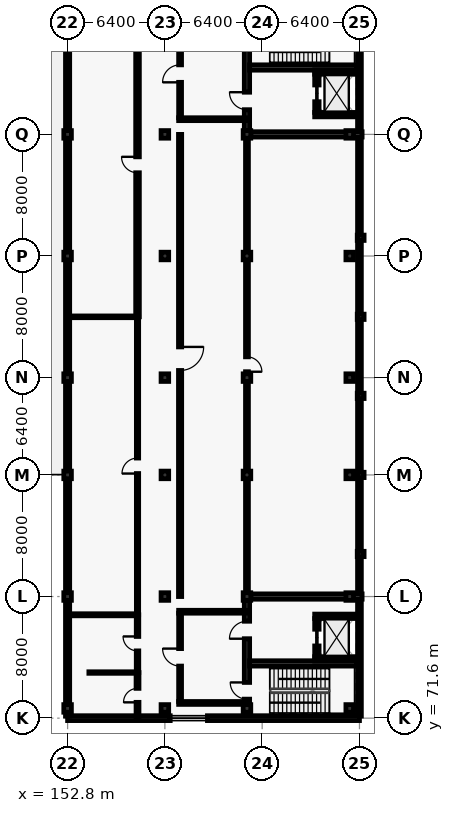
"""IFC4 building model, lengths in metres.
Left out: names, types, materials, properties, quantities, classifications, styles, units other than length and angle.
Written with IfcOpenShell. Run it as: python <this file> out.ifc"""

import sys

from ifc_helpers import new_model, si_unit, direction, frame, frame_2d, origin, origin_2d, place, context, subcontext, project, spatial, rectangle, extrude, element, fill, save


model = new_model("IFC4")
c1 = context("Model", 3, precision=1e-05, world=origin(), true_north=direction((0.0, 1.0)))
c2 = subcontext(c1, "Body", "Model", "MODEL_VIEW")
j1 = project(units=[si_unit("LENGTHUNIT", "METRE"), si_unit("PLANEANGLEUNIT", "RADIAN")], contexts=[c1])
p1 = place(None, origin())
s1 = spatial("IfcSite", under=j1, at=p1, CompositionType="ELEMENT")
p2 = place(p1, origin())
s2 = spatial("IfcBuilding", under=s1, at=p2, CompositionType="ELEMENT")
p3 = place(p2, frame((0.0, 0.0, 24.9)))
s3 = spatial("IfcBuildingStorey", under=s2, at=p3, CompositionType="ELEMENT", Elevation=24.9)
for number, where, z_axis, x_axis in (
    (1, (152.8, 72.24, 0.0), (0.0, 0.0, 1.0), (1.0, 0.0, 0.0)),
    (2, (152.8, 79.6, 0.0), (0.0, 0.0, 1.0), (1.0, 0.0, 0.0)),
    (3, (152.8, 87.6, 0.0), (0.0, 0.0, 1.0), (1.0, 0.0, 0.0)),
    (4, (152.8, 94.0, 0.0), (0.0, 0.0, 1.0), (1.0, 0.0, 0.0)),
    (5, (152.8, 102.0, 0.0), (0.0, 0.0, 1.0), (1.0, 0.0, 0.0)),
    (6, (152.8, 110.0, 0.0), (0.0, 0.0, 1.0), (1.0, 0.0, 0.0)),
    (7, (159.2, 72.24, 0.0), (0.0, 0.0, 1.0), (1.0, 0.0, 0.0)),
    (8, (159.2, 79.6, 0.0), (0.0, 0.0, 1.0), (1.0, 0.0, 0.0)),
    (9, (159.2, 87.6, 0.0), (0.0, 0.0, 1.0), (1.0, 0.0, 0.0)),
    (10, (159.2, 94.0, 0.0), (0.0, 0.0, 1.0), (1.0, 0.0, 0.0)),
    (11, (159.2, 102.0, 0.0), (0.0, 0.0, 1.0), (1.0, 0.0, 0.0)),
    (12, (159.2, 110.0, 0.0), (0.0, 0.0, 1.0), (1.0, 0.0, 0.0)),
    (13, (164.6, 72.24, 0.0), (0.0, 0.0, 1.0), (1.0, 0.0, 0.0)),
    (14, (164.6, 79.6, 0.0), (0.0, 0.0, 1.0), (1.0, 0.0, 0.0)),
    (15, (164.6, 87.6, 0.0), (0.0, 0.0, 1.0), (1.0, 0.0, 0.0)),
    (16, (164.6, 94.0, 0.0), (0.0, 0.0, 1.0), (1.0, 0.0, 0.0)),
    (17, (164.6, 102.0, 0.0), (0.0, 0.0, 1.0), (1.0, 0.0, 0.0)),
    (18, (164.6, 110.0, 0.0), (0.0, 0.0, 1.0), (1.0, 0.0, 0.0)),
    (19, (171.36, 72.24, 0.0), (0.0, 0.0, 1.0), (1.0, 0.0, 0.0)),
    (20, (171.36, 79.6, 0.0), (0.0, 0.0, 1.0), (1.0, 0.0, 0.0)),
    (21, (171.36, 87.6, 0.0), (0.0, 0.0, 1.0), (1.0, 0.0, 0.0)),
    (22, (171.36, 94.0, 0.0), (0.0, 0.0, 1.0), (1.0, 0.0, 0.0)),
    (23, (171.36, 102.0, 0.0), (0.0, 0.0, 1.0), (1.0, 0.0, 0.0)),
    (24, (171.36, 110.0, 0.0), (0.0, 0.0, 1.0), (1.0, 0.0, 0.0)),
):
    element("IfcColumn", number, at=place(p3, frame(where, z_axis=z_axis, x_axis=x_axis)), inside=s3, PredefinedType="COLUMN", context=c2, shape_type="SweptSolid", body=[
        extrude(rectangle(XDim=0.5, YDim=0.5, at=origin_2d()), origin(), (0.0, 0.0, 1.0), 4.5),
    ])
for number, where, z_axis, x_axis in (
    (25, (172.08, 82.4, 0.0), (0.0, 0.0, 1.0), (1.0, 0.0, 0.0)),
    (26, (172.08, 87.6, 0.0), (0.0, 0.0, 1.0), (1.0, 0.0, 0.0)),
    (27, (172.08, 92.8, 0.0), (0.0, 0.0, 1.0), (1.0, 0.0, 0.0)),
    (28, (172.08, 98.0, 0.0), (0.0, 0.0, 1.0), (1.0, 0.0, 0.0)),
    (29, (172.08, 103.2, 0.0), (0.0, 0.0, 1.0), (1.0, 0.0, 0.0)),
):
    element("IfcColumn", number, at=place(p3, frame(where, z_axis=z_axis, x_axis=x_axis)), inside=s3, PredefinedType="PILASTER", context=c2, shape_type="SweptSolid", body=[
        extrude(rectangle(XDim=0.35, YDim=0.45, at=origin_2d()), origin(), (0.0, 0.0, 1.0), 4.5),
    ])
p4 = place(p3, frame((172.0, 117.86, 0.0), z_axis=(0.0, 0.0, 1.0), x_axis=(0.0, -1.0, 0.0)))
e30 = element("IfcWall", 30, at=p4, inside=s3, PredefinedType="SOLIDWALL", context=c2, shape_type="SweptSolid", body=[
    extrude(rectangle(XDim=46.12, YDim=0.25, at=frame_2d((23.06, 0.0))), origin(), (0.0, 0.0, 1.0), 4.3),
])
p5 = place(p3, frame((172.0, 71.6, 0.0), z_axis=(0.0, 0.0, 1.0), x_axis=(-1.0, 0.0, 0.0)))
e31 = element("IfcWall", 31, at=p5, inside=s3, PredefinedType="SOLIDWALL", context=c2, shape_type="SweptSolid", body=[
    extrude(rectangle(XDim=19.2, YDim=0.32, at=frame_2d((9.6, 0.0))), origin(), (0.0, 0.0, 1.0), 4.3),
])
p6 = place(p5, frame((10.0, 0.0, 0.8)))
e32 = element("IfcOpeningElement", 32, at=p6, cuts=e31, PredefinedType="OPENING", context=c2, shape_type="SweptSolid", body=[
    extrude(rectangle(XDim=2.45, YDim=2.8, at=frame_2d((1.225, 1.4))), frame((0.0, 0.17, 0.0), z_axis=(0.0, -1.0, 0.0), x_axis=(1.0, 0.0, 0.0)), (0.0, 0.0, 1.0), 0.34),
])
p7 = place(p3, frame((152.8, 71.74, 0.0), z_axis=(0.0, 0.0, 1.0), x_axis=(0.0, 1.0, 0.0)))
e33 = element("IfcWall", 33, at=p7, inside=s3, PredefinedType="SOLIDWALL", context=c2, shape_type="SweptSolid", body=[
    extrude(rectangle(XDim=46.12, YDim=0.275, at=frame_2d((23.06, 0.0))), origin(), (0.0, 0.0, 1.0), 3.45),
])
p8 = place(p3, frame((164.852, 79.6, 0.0), z_axis=(0.0, 0.0, 1.0), x_axis=(1.0, 0.0, 0.0)))
e34 = element("IfcWall", 34, at=p8, inside=s3, PredefinedType="SHEAR", context=c2, shape_type="SweptSolid", body=[
    extrude(rectangle(XDim=7.323, YDim=0.35, at=frame_2d((3.662, 0.0))), origin(), (0.0, 0.0, 1.0), 4.3),
])
p9 = place(p3, frame((164.6, 71.775, 0.0), z_axis=(0.0, 0.0, 1.0), x_axis=(0.0, 1.0, 0.0)))
e35 = element("IfcWall", 35, at=p9, inside=s3, PredefinedType="SHEAR", context=c2, shape_type="SweptSolid", body=[
    extrude(rectangle(XDim=7.573, YDim=0.35, at=frame_2d((3.787, 0.0))), origin(), (0.0, 0.0, 1.0), 4.3),
])
p10 = place(p9, frame((1.075, 0.0, 0.0)))
e36 = element("IfcOpeningElement", 36, at=p10, cuts=e35, PredefinedType="OPENING", context=c2, shape_type="SweptSolid", body=[
    extrude(rectangle(XDim=1.1, YDim=2.15, at=frame_2d((0.55, 1.075))), frame((0.0, 0.185, 0.0), z_axis=(0.0, -1.0, 0.0), x_axis=(1.0, 0.0, 0.0)), (0.0, 0.0, 1.0), 0.37),
])
p11 = place(p9, frame((5.05, 0.0, 0.0)))
e37 = element("IfcOpeningElement", 37, at=p11, cuts=e35, PredefinedType="OPENING", context=c2, shape_type="SweptSolid", body=[
    extrude(rectangle(XDim=1.15, YDim=2.2, at=frame_2d((0.575, 1.1))), frame((0.0, 0.185, 0.0), z_axis=(0.0, -1.0, 0.0), x_axis=(1.0, 0.0, 0.0)), (0.0, 0.0, 1.0), 0.37),
])
p12 = place(p3, frame((164.775, 75.2, 0.0), z_axis=(0.0, 0.0, 1.0), x_axis=(1.0, 0.0, 0.0)))
e38 = element("IfcWall", 38, at=p12, inside=s3, PredefinedType="SHEAR", context=c2, shape_type="SweptSolid", body=[
    extrude(rectangle(XDim=7.05, YDim=0.35, at=frame_2d((3.525, 0.0))), origin(), (0.0, 0.0, 1.0), 4.3),
])
for number, where, z_axis, x_axis in (
    (39, (169.055, 75.5, 0.0), (0.0, 0.0, 1.0), (1.0, 0.0, 0.0)),
    (40, (169.055, 78.3, 0.0), (0.0, 0.0, 1.0), (1.0, 0.0, 0.0)),
):
    element("IfcWall", number, at=place(p3, frame(where, z_axis=z_axis, x_axis=x_axis)), inside=s3, PredefinedType="SHEAR", context=c2, shape_type="SweptSolid", body=[
        extrude(rectangle(XDim=2.89, YDim=0.29, at=frame_2d((1.445, 0.0))), origin(), (0.0, 0.0, 1.0), 4.3),
    ])
p13 = place(p3, frame((169.2, 75.645, 0.0), z_axis=(0.0, 0.0, 1.0), x_axis=(0.0, 1.0, 0.0)))
e41 = element("IfcWall", 41, at=p13, inside=s3, PredefinedType="SHEAR", context=c2, shape_type="SweptSolid", body=[
    extrude(rectangle(XDim=2.51, YDim=0.29, at=frame_2d((1.255, 0.0))), origin(), (0.0, 0.0, 1.0), 4.3),
])
p14 = place(p13, frame((0.705, 0.0, 0.0)))
e42 = element("IfcOpeningElement", 42, at=p14, cuts=e41, PredefinedType="OPENING", context=c2, shape_type="SweptSolid", body=[
    extrude(rectangle(XDim=1.1, YDim=2.15, at=frame_2d((0.55, 1.075))), frame((0.0, 0.155, 0.0), z_axis=(0.0, -1.0, 0.0), x_axis=(1.0, 0.0, 0.0)), (0.0, 0.0, 1.0), 0.31),
])
p15 = place(p3, frame((160.105, 72.6, 0.0), z_axis=(0.0, 0.0, 1.0), x_axis=(1.0, 0.0, 0.0)))
e43 = element("IfcWall", 43, at=p15, inside=s3, PredefinedType="PARTITIONING", context=c2, shape_type="SweptSolid", body=[
    extrude(rectangle(XDim=4.495, YDim=0.19, at=frame_2d((2.248, 0.0))), origin(), (0.0, 0.0, 1.0), 3.65),
])
p16 = place(p3, frame((160.105, 78.6, 0.0), z_axis=(0.0, 0.0, 1.0), x_axis=(1.0, 0.0, 0.0)))
e44 = element("IfcWall", 44, at=p16, inside=s3, PredefinedType="PARTITIONING", context=c2, shape_type="SweptSolid", body=[
    extrude(rectangle(XDim=4.495, YDim=0.19, at=frame_2d((2.248, 0.0))), origin(), (0.0, 0.0, 1.0), 4.3),
])
p17 = place(p3, frame((160.2, 72.695, 0.0), z_axis=(0.0, 0.0, 1.0), x_axis=(0.0, 1.0, 0.0)))
e45 = element("IfcWall", 45, at=p17, inside=s3, PredefinedType="PARTITIONING", context=c2, shape_type="SweptSolid", body=[
    extrude(rectangle(XDim=5.81, YDim=0.19, at=frame_2d((2.905, 0.0))), origin(), (0.0, 0.0, 1.0), 4.3),
])
p18 = place(p17, frame((2.33, 0.0, 0.0)))
e46 = element("IfcOpeningElement", 46, at=p18, cuts=e45, PredefinedType="OPENING", context=c2, shape_type="SweptSolid", body=[
    extrude(rectangle(XDim=1.15, YDim=2.2, at=frame_2d((0.575, 1.1))), frame((0.0, 0.105, 0.0), z_axis=(0.0, -1.0, 0.0), x_axis=(1.0, 0.0, 0.0)), (0.0, 0.0, 1.0), 0.21),
])
p19 = place(p3, frame((164.852, 110.0, 0.0), z_axis=(0.0, 0.0, 1.0), x_axis=(1.0, 0.0, 0.0)))
e47 = element("IfcWall", 47, at=p19, inside=s3, PredefinedType="SHEAR", context=c2, shape_type="SweptSolid", body=[
    extrude(rectangle(XDim=7.323, YDim=0.35, at=frame_2d((3.662, 0.0))), origin(), (0.0, 0.0, 1.0), 4.3),
])
p20 = place(p3, frame((164.6, 110.252, 0.0), z_axis=(0.0, 0.0, 1.0), x_axis=(0.0, 1.0, 0.0)))
e48 = element("IfcWall", 48, at=p20, inside=s3, PredefinedType="SHEAR", context=c2, shape_type="SweptSolid", body=[
    extrude(rectangle(XDim=7.573, YDim=0.35, at=frame_2d((3.787, 0.0))), origin(), (0.0, 0.0, 1.0), 4.3),
])
p21 = place(p20, frame((5.398, 0.0, 0.0)))
e49 = element("IfcOpeningElement", 49, at=p21, cuts=e48, PredefinedType="OPENING", context=c2, shape_type="SweptSolid", body=[
    extrude(rectangle(XDim=1.1, YDim=2.15, at=frame_2d((0.55, 1.075))), frame((0.0, 0.185, 0.0), z_axis=(0.0, -1.0, 0.0), x_axis=(1.0, 0.0, 0.0)), (0.0, 0.0, 1.0), 0.37),
])
p22 = place(p20, frame((1.373, 0.0, 0.0)))
e50 = element("IfcOpeningElement", 50, at=p22, cuts=e48, PredefinedType="OPENING", context=c2, shape_type="SweptSolid", body=[
    extrude(rectangle(XDim=1.15, YDim=2.2, at=frame_2d((0.575, 1.1))), frame((0.0, 0.185, 0.0), z_axis=(0.0, -1.0, 0.0), x_axis=(1.0, 0.0, 0.0)), (0.0, 0.0, 1.0), 0.37),
])
p23 = place(p3, frame((164.775, 114.4, 0.0), z_axis=(0.0, 0.0, 1.0), x_axis=(1.0, 0.0, 0.0)))
e51 = element("IfcWall", 51, at=p23, inside=s3, PredefinedType="SHEAR", context=c2, shape_type="SweptSolid", body=[
    extrude(rectangle(XDim=7.05, YDim=0.35, at=frame_2d((3.525, 0.0))), origin(), (0.0, 0.0, 1.0), 4.3),
])
for number, where, z_axis, x_axis in (
    (52, (169.055, 111.3, 0.0), (0.0, 0.0, 1.0), (1.0, 0.0, 0.0)),
    (53, (169.055, 114.1, 0.0), (0.0, 0.0, 1.0), (1.0, 0.0, 0.0)),
):
    element("IfcWall", number, at=place(p3, frame(where, z_axis=z_axis, x_axis=x_axis)), inside=s3, PredefinedType="SHEAR", context=c2, shape_type="SweptSolid", body=[
        extrude(rectangle(XDim=2.89, YDim=0.29, at=frame_2d((1.445, 0.0))), origin(), (0.0, 0.0, 1.0), 4.3),
    ])
p24 = place(p3, frame((169.2, 111.445, 0.0), z_axis=(0.0, 0.0, 1.0), x_axis=(0.0, 1.0, 0.0)))
e54 = element("IfcWall", 54, at=p24, inside=s3, PredefinedType="SHEAR", context=c2, shape_type="SweptSolid", body=[
    extrude(rectangle(XDim=2.51, YDim=0.29, at=frame_2d((1.255, 0.0))), origin(), (0.0, 0.0, 1.0), 4.3),
])
p25 = place(p24, frame((0.705, 0.0, 0.0)))
e55 = element("IfcOpeningElement", 55, at=p25, cuts=e54, PredefinedType="OPENING", context=c2, shape_type="SweptSolid", body=[
    extrude(rectangle(XDim=1.1, YDim=2.15, at=frame_2d((0.55, 1.075))), frame((0.0, 0.155, 0.0), z_axis=(0.0, -1.0, 0.0), x_axis=(1.0, 0.0, 0.0)), (0.0, 0.0, 1.0), 0.31),
])
p26 = place(p3, frame((160.105, 111.0, 0.0), z_axis=(0.0, 0.0, 1.0), x_axis=(1.0, 0.0, 0.0)))
e56 = element("IfcWall", 56, at=p26, inside=s3, PredefinedType="PARTITIONING", context=c2, shape_type="SweptSolid", body=[
    extrude(rectangle(XDim=4.495, YDim=0.19, at=frame_2d((2.248, 0.0))), origin(), (0.0, 0.0, 1.0), 4.3),
])
p27 = place(p3, frame((160.2, 111.095, 0.0), z_axis=(0.0, 0.0, 1.0), x_axis=(0.0, 1.0, 0.0)))
e57 = element("IfcWall", 57, at=p27, inside=s3, PredefinedType="PARTITIONING", context=c2, shape_type="SweptSolid", body=[
    extrude(rectangle(XDim=5.81, YDim=0.19, at=frame_2d((2.905, 0.0))), origin(), (0.0, 0.0, 1.0), 4.3),
])
p28 = place(p27, frame((2.33, 0.0, 0.0)))
e58 = element("IfcOpeningElement", 58, at=p28, cuts=e57, PredefinedType="OPENING", context=c2, shape_type="SweptSolid", body=[
    extrude(rectangle(XDim=1.15, YDim=2.2, at=frame_2d((0.575, 1.1))), frame((0.0, 0.105, 0.0), z_axis=(0.0, -1.0, 0.0), x_axis=(1.0, 0.0, 0.0)), (0.0, 0.0, 1.0), 0.21),
])
p29 = place(p3, frame((157.4, 71.6, 0.0), z_axis=(0.0, 0.0, 1.0), x_axis=(0.0, 1.0, 0.0)))
e59 = element("IfcWall", 59, at=p29, inside=s3, PredefinedType="PARTITIONING", context=c2, shape_type="SweptSolid", body=[
    extrude(rectangle(XDim=3.0, YDim=0.19, at=frame_2d((1.5, 0.0))), origin(), (0.0, 0.0, 1.0), 4.3),
])
p30 = place(p29, frame((1.04, 0.0, 0.0)))
e60 = element("IfcOpeningElement", 60, at=p30, cuts=e59, PredefinedType="OPENING", context=c2, shape_type="SweptSolid", body=[
    extrude(rectangle(XDim=0.92, YDim=2.1, at=frame_2d((0.46, 1.05))), frame((0.0, 0.105, 0.0), z_axis=(0.0, -1.0, 0.0), x_axis=(1.0, 0.0, 0.0)), (0.0, 0.0, 1.0), 0.21),
])
p31 = place(p3, frame((157.4, 74.6, 0.0), z_axis=(0.0, 0.0, 1.0), x_axis=(0.0, 1.0, 0.0)))
e61 = element("IfcWall", 61, at=p31, inside=s3, PredefinedType="PARTITIONING", context=c2, shape_type="SweptSolid", body=[
    extrude(rectangle(XDim=3.8, YDim=0.165, at=frame_2d((1.9, 0.0))), origin(), (0.0, 0.0, 1.0), 4.3),
])
p32 = place(p31, frame((1.425, 0.0, 0.0)))
e62 = element("IfcOpeningElement", 62, at=p32, cuts=e61, PredefinedType="OPENING", context=c2, shape_type="SweptSolid", body=[
    extrude(rectangle(XDim=0.95, YDim=2.1, at=frame_2d((0.475, 1.05))), frame((0.0, 0.093, 0.0), z_axis=(0.0, -1.0, 0.0), x_axis=(1.0, 0.0, 0.0)), (0.0, 0.0, 1.0), 0.185),
])
p33 = place(p3, frame((157.4, 78.4, 0.0), z_axis=(0.0, 0.0, 1.0), x_axis=(0.0, 1.0, 0.0)))
e63 = element("IfcWall", 63, at=p33, inside=s3, PredefinedType="PARTITIONING", context=c2, shape_type="SweptSolid", body=[
    extrude(rectangle(XDim=19.6, YDim=0.15, at=frame_2d((9.8, 0.0))), origin(), (0.0, 0.0, 1.0), 4.3),
])
p34 = place(p33, frame((9.29, 0.0, 0.0)))
e64 = element("IfcOpeningElement", 64, at=p34, cuts=e63, PredefinedType="OPENING", context=c2, shape_type="SweptSolid", body=[
    extrude(rectangle(XDim=1.02, YDim=2.1, at=frame_2d((0.51, 1.05))), frame((0.0, 0.085, 0.0), z_axis=(0.0, -1.0, 0.0), x_axis=(1.0, 0.0, 0.0)), (0.0, 0.0, 1.0), 0.17),
])
p35 = place(p3, frame((157.4, 98.0, 0.0), z_axis=(0.0, 0.0, 1.0), x_axis=(0.0, 1.0, 0.0)))
e65 = element("IfcWall", 65, at=p35, inside=s3, PredefinedType="PARTITIONING", context=c2, shape_type="SweptSolid", body=[
    extrude(rectangle(XDim=20.0, YDim=0.24, at=frame_2d((10.0, 0.0))), origin(), (0.0, 0.0, 1.0), 4.3),
])
p36 = place(p35, frame((9.475, 0.0, 0.0)))
e66 = element("IfcOpeningElement", 66, at=p36, cuts=e65, PredefinedType="OPENING", context=c2, shape_type="SweptSolid", body=[
    extrude(rectangle(XDim=1.05, YDim=2.15, at=frame_2d((0.525, 1.075))), frame((0.0, 0.13, 0.0), z_axis=(0.0, -1.0, 0.0), x_axis=(1.0, 0.0, 0.0)), (0.0, 0.0, 1.0), 0.26),
])
p37 = place(p3, frame((160.2, 110.0, 0.0), z_axis=(0.0, 0.0, 1.0), x_axis=(0.0, -1.0, 0.0)))
e67 = element("IfcWall", 67, at=p37, inside=s3, PredefinedType="PARTITIONING", context=c2, shape_type="SweptSolid", body=[
    extrude(rectangle(XDim=30.4, YDim=0.21, at=frame_2d((15.2, 0.0))), origin(), (0.0, 0.0, 1.0), 4.3),
])
p38 = place(p37, frame((13.98, 0.0, 0.0)))
e68 = element("IfcOpeningElement", 68, at=p38, cuts=e67, PredefinedType="OPENING", context=c2, shape_type="SweptSolid", body=[
    extrude(rectangle(XDim=1.55, YDim=2.25, at=frame_2d((0.775, 1.125))), frame((0.0, 0.115, 0.0), z_axis=(0.0, -1.0, 0.0), x_axis=(1.0, 0.0, 0.0)), (0.0, 0.0, 1.0), 0.23),
])
p39 = place(p3, frame((154.2, 74.6, 0.0), z_axis=(0.0, 0.0, 1.0), x_axis=(1.0, 0.0, 0.0)))
e69 = element("IfcWall", 69, at=p39, inside=s3, PredefinedType="PARTITIONING", context=c2, shape_type="SweptSolid", body=[
    extrude(rectangle(XDim=3.2, YDim=0.1, at=frame_2d((1.6, 0.0))), origin(), (0.0, 0.0, 1.0), 4.3),
])
p40 = place(p3, frame((152.8, 78.4, 0.0), z_axis=(0.0, 0.0, 1.0), x_axis=(1.0, 0.0, 0.0)))
e70 = element("IfcWall", 70, at=p40, inside=s3, PredefinedType="PARTITIONING", context=c2, shape_type="SweptSolid", body=[
    extrude(rectangle(XDim=4.6, YDim=0.135, at=frame_2d((2.3, 0.0))), origin(), (0.0, 0.0, 1.0), 4.3),
])
p41 = place(p3, frame((152.8, 98.0, 0.0), z_axis=(0.0, 0.0, 1.0), x_axis=(1.0, 0.0, 0.0)))
e71 = element("IfcWall", 71, at=p41, inside=s3, PredefinedType="PARTITIONING", context=c2, shape_type="SweptSolid", body=[
    extrude(rectangle(XDim=4.6, YDim=0.115, at=frame_2d((2.3, 0.0))), origin(), (0.0, 0.0, 1.0), 4.3),
])
p42 = place(p3, frame((164.6, 109.748, 0.0), z_axis=(0.0, 0.0, 1.0), x_axis=(0.0, -1.0, 0.0)))
e72 = element("IfcWall", 72, at=p42, inside=s3, PredefinedType="PARTITIONING", context=c2, shape_type="SweptSolid", body=[
    extrude(rectangle(XDim=29.896, YDim=0.19, at=frame_2d((14.948, 0.0))), origin(), (0.0, 0.0, 1.0), 3.45),
])
p43 = place(p42, frame((14.38, 0.0, 0.0)))
e73 = element("IfcOpeningElement", 73, at=p43, cuts=e72, PredefinedType="OPENING", context=c2, shape_type="SweptSolid", body=[
    extrude(rectangle(XDim=0.98, YDim=2.1, at=frame_2d((0.49, 1.05))), frame((0.0, 0.105, 0.0), z_axis=(0.0, -1.0, 0.0), x_axis=(1.0, 0.0, 0.0)), (0.0, 0.0, 1.0), 0.21),
])
p44 = place(p6, origin())
e74 = element("IfcWindow", 74, at=p44, inside=s3, PartitioningType="SINGLE_PANEL", PredefinedType="WINDOW", context=c2, shape_type="SweptSolid", body=[
    extrude(rectangle(XDim=2.45, YDim=2.8, at=frame_2d((1.225, 1.4))), frame((0.0, 0.03, 0.0), z_axis=(0.0, -1.0, 0.0), x_axis=(1.0, 0.0, 0.0)), (0.0, 0.0, 1.0), 0.06),
])
fill(e32, e74)
p45 = place(p10, origin())
e75 = element("IfcDoor", 75, at=p45, inside=s3, OperationType="SINGLE_SWING_RIGHT", PredefinedType="DOOR", context=c2, shape_type="SweptSolid", body=[
    extrude(rectangle(XDim=1.1, YDim=2.15, at=frame_2d((0.55, 1.075))), frame((0.0, 0.025, 0.0), z_axis=(0.0, -1.0, 0.0), x_axis=(1.0, 0.0, 0.0)), (0.0, 0.0, 1.0), 0.05),
])
fill(e36, e75)
p46 = place(p11, origin())
e76 = element("IfcDoor", 76, at=p46, inside=s3, OperationType="SINGLE_SWING_LEFT", PredefinedType="DOOR", context=c2, shape_type="SweptSolid", body=[
    extrude(rectangle(XDim=1.15, YDim=2.2, at=frame_2d((0.575, 1.1))), frame((0.0, 0.025, 0.0), z_axis=(0.0, -1.0, 0.0), x_axis=(1.0, 0.0, 0.0)), (0.0, 0.0, 1.0), 0.05),
])
fill(e37, e76)
p47 = place(p14, origin())
e77 = element("IfcDoor", 77, at=p47, inside=s3, OperationType="SLIDING_TO_LEFT", PredefinedType="DOOR", context=c2, shape_type="SweptSolid", body=[
    extrude(rectangle(XDim=1.1, YDim=2.15, at=frame_2d((0.55, 1.075))), frame((0.0, 0.025, 0.0), z_axis=(0.0, -1.0, 0.0), x_axis=(1.0, 0.0, 0.0)), (0.0, 0.0, 1.0), 0.05),
])
fill(e42, e77)
p48 = place(p18, origin())
e78 = element("IfcDoor", 78, at=p48, inside=s3, OperationType="SINGLE_SWING_RIGHT", PredefinedType="DOOR", context=c2, shape_type="SweptSolid", body=[
    extrude(rectangle(XDim=1.15, YDim=2.2, at=frame_2d((0.575, 1.1))), frame((0.0, 0.025, 0.0), z_axis=(0.0, -1.0, 0.0), x_axis=(1.0, 0.0, 0.0)), (0.0, 0.0, 1.0), 0.05),
])
fill(e46, e78)
p49 = place(p22, origin())
e79 = element("IfcDoor", 79, at=p49, inside=s3, OperationType="SINGLE_SWING_RIGHT", PredefinedType="DOOR", context=c2, shape_type="SweptSolid", body=[
    extrude(rectangle(XDim=1.15, YDim=2.2, at=frame_2d((0.575, 1.1))), frame((0.0, 0.025, 0.0), z_axis=(0.0, -1.0, 0.0), x_axis=(1.0, 0.0, 0.0)), (0.0, 0.0, 1.0), 0.05),
])
fill(e50, e79)
p50 = place(p25, origin())
e80 = element("IfcDoor", 80, at=p50, inside=s3, OperationType="SLIDING_TO_LEFT", PredefinedType="DOOR", context=c2, shape_type="SweptSolid", body=[
    extrude(rectangle(XDim=1.1, YDim=2.15, at=frame_2d((0.55, 1.075))), frame((0.0, 0.025, 0.0), z_axis=(0.0, -1.0, 0.0), x_axis=(1.0, 0.0, 0.0)), (0.0, 0.0, 1.0), 0.05),
])
fill(e55, e80)
p51 = place(p28, origin())
e81 = element("IfcDoor", 81, at=p51, inside=s3, OperationType="SINGLE_SWING_LEFT", PredefinedType="DOOR", context=c2, shape_type="SweptSolid", body=[
    extrude(rectangle(XDim=1.15, YDim=2.2, at=frame_2d((0.575, 1.1))), frame((0.0, 0.025, 0.0), z_axis=(0.0, -1.0, 0.0), x_axis=(1.0, 0.0, 0.0)), (0.0, 0.0, 1.0), 0.05),
])
fill(e58, e81)
p52 = place(p30, origin())
e82 = element("IfcDoor", 82, at=p52, inside=s3, OperationType="SINGLE_SWING_LEFT", PredefinedType="DOOR", context=c2, shape_type="SweptSolid", body=[
    extrude(rectangle(XDim=0.92, YDim=2.1, at=frame_2d((0.46, 1.05))), frame((0.0, 0.025, 0.0), z_axis=(0.0, -1.0, 0.0), x_axis=(1.0, 0.0, 0.0)), (0.0, 0.0, 1.0), 0.05),
])
fill(e60, e82)
p53 = place(p32, origin())
e83 = element("IfcDoor", 83, at=p53, inside=s3, OperationType="SINGLE_SWING_RIGHT", PredefinedType="DOOR", context=c2, shape_type="SweptSolid", body=[
    extrude(rectangle(XDim=0.95, YDim=2.1, at=frame_2d((0.475, 1.05))), frame((0.0, 0.025, 0.0), z_axis=(0.0, -1.0, 0.0), x_axis=(1.0, 0.0, 0.0)), (0.0, 0.0, 1.0), 0.05),
])
fill(e62, e83)
p54 = place(p34, origin())
e84 = element("IfcDoor", 84, at=p54, inside=s3, OperationType="SINGLE_SWING_LEFT", PredefinedType="DOOR", context=c2, shape_type="SweptSolid", body=[
    extrude(rectangle(XDim=1.02, YDim=2.1, at=frame_2d((0.51, 1.05))), frame((0.0, 0.025, 0.0), z_axis=(0.0, -1.0, 0.0), x_axis=(1.0, 0.0, 0.0)), (0.0, 0.0, 1.0), 0.05),
])
fill(e64, e84)
p55 = place(p36, origin())
e85 = element("IfcDoor", 85, at=p55, inside=s3, OperationType="SINGLE_SWING_RIGHT", PredefinedType="DOOR", context=c2, shape_type="SweptSolid", body=[
    extrude(rectangle(XDim=1.05, YDim=2.15, at=frame_2d((0.525, 1.075))), frame((0.0, 0.025, 0.0), z_axis=(0.0, -1.0, 0.0), x_axis=(1.0, 0.0, 0.0)), (0.0, 0.0, 1.0), 0.05),
])
fill(e66, e85)
p56 = place(p38, origin())
e86 = element("IfcDoor", 86, at=p56, inside=s3, OperationType="SINGLE_SWING_LEFT", PredefinedType="DOOR", context=c2, shape_type="SweptSolid", body=[
    extrude(rectangle(XDim=1.55, YDim=2.25, at=frame_2d((0.775, 1.125))), frame((0.0, 0.025, 0.0), z_axis=(0.0, -1.0, 0.0), x_axis=(1.0, 0.0, 0.0)), (0.0, 0.0, 1.0), 0.05),
])
fill(e68, e86)
p57 = place(p43, origin())
e87 = element("IfcDoor", 87, at=p57, inside=s3, OperationType="SINGLE_SWING_RIGHT", PredefinedType="DOOR", context=c2, shape_type="SweptSolid", body=[
    extrude(rectangle(XDim=0.98, YDim=2.1, at=frame_2d((0.49, 1.05))), frame((0.0, 0.025, 0.0), z_axis=(0.0, -1.0, 0.0), x_axis=(1.0, 0.0, 0.0)), (0.0, 0.0, 1.0), 0.05),
])
fill(e73, e87)
save(model, sys.argv[1])
